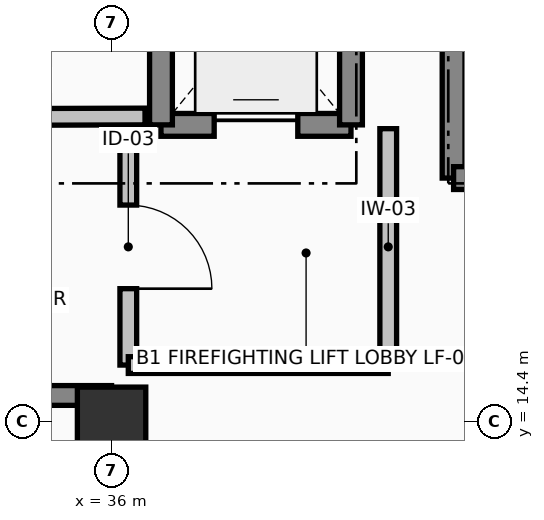
"""IFC4 building model, lengths in metres.
Left out: names, types, materials, properties, quantities, classifications, styles, units other than length and angle.
Written with IfcOpenShell. Run it as: python <this file> out.ifc"""

import sys

from ifc_helpers import new_model, si_unit, direction, frame, frame_2d, origin, origin_2d, place, context, subcontext, project, spatial, rectangle, extrude, element, fill, save


model = new_model("IFC4")
c1 = context("Model", 3, precision=1e-05, world=origin(), true_north=direction((0.0, 1.0)))
c2 = subcontext(c1, "Body", "Model", "MODEL_VIEW")
j1 = project(units=[si_unit("LENGTHUNIT", "METRE"), si_unit("PLANEANGLEUNIT", "RADIAN")], contexts=[c1])
p1 = place(None, origin())
s1 = spatial("IfcSite", under=j1, at=p1, CompositionType="ELEMENT")
p2 = place(p1, origin())
s2 = spatial("IfcBuilding", under=s1, at=p2, CompositionType="ELEMENT")
p3 = place(p2, frame((0.0, 0.0, -4.08)))
s3 = spatial("IfcBuildingStorey", under=s2, at=p3, CompositionType="ELEMENT", Elevation=-4.08)
p4 = place(p3, frame((36.0, 14.4, -0.42), z_axis=(0.0, 0.0, 1.0), x_axis=(1.0, 0.0, 0.0)))
e1 = element("IfcColumn", 1, at=p4, inside=s3, PredefinedType="COLUMN", context=c2, shape_type="SweptSolid", body=[
    extrude(rectangle(XDim=0.9, YDim=0.9, at=origin_2d()), origin(), (0.0, 0.0, 1.0), 4.5),
])
p5 = place(p3, frame((40.5, 17.6, 0.0), z_axis=(0.0, 0.0, 1.0), x_axis=(0.0, 1.0, 0.0)))
e2 = element("IfcWall", 2, at=p5, inside=s3, PredefinedType="SHEAR", context=c2, shape_type="SweptSolid", body=[
    extrude(rectangle(XDim=3.8, YDim=0.3, at=frame_2d((1.9, 0.0))), origin(), (0.0, 0.0, 1.0), 4.08),
])
p6 = place(p3, frame((40.5, 17.6, 0.0), z_axis=(0.0, 0.0, 1.0), x_axis=(1.0, 0.0, 0.0)))
e3 = element("IfcWall", 3, at=p6, inside=s3, PredefinedType="SHEAR", context=c2, shape_type="SweptSolid", body=[
    extrude(rectangle(XDim=9.0, YDim=0.3, at=frame_2d((4.5, 0.0))), origin(), (0.0, 0.0, 1.0), 4.08),
])
p7 = place(p6, frame((0.35, 0.0, 0.0)))
e4 = element("IfcOpeningElement", 4, at=p7, cuts=e3, PredefinedType="OPENING", context=c2, shape_type="SweptSolid", body=[
    extrude(rectangle(XDim=1.15, YDim=2.15, at=frame_2d((0.575, 1.075))), frame((0.0, 0.16, 0.0), z_axis=(0.0, -1.0, 0.0), x_axis=(1.0, 0.0, 0.0)), (0.0, 0.0, 1.0), 0.32),
])
p8 = place(p3, frame((36.65, 18.3, 0.0), z_axis=(0.0, 0.0, 1.0), x_axis=(1.0, 0.0, 0.0)))
e5 = element("IfcWall", 5, at=p8, inside=s3, PredefinedType="SHEAR", context=c2, shape_type="SweptSolid", body=[
    extrude(rectangle(XDim=2.5, YDim=0.3, at=frame_2d((1.25, 0.0))), origin(), (0.0, 0.0, 1.0), 4.08),
])
p9 = place(p8, frame((0.7, 0.0, 0.0)))
e6 = element("IfcOpeningElement", 6, at=p9, cuts=e5, PredefinedType="OPENING", context=c2, shape_type="SweptSolid", body=[
    extrude(rectangle(XDim=1.1, YDim=2.1, at=frame_2d((0.55, 1.05))), frame((0.0, 0.16, 0.0), z_axis=(0.0, -1.0, 0.0), x_axis=(1.0, 0.0, 0.0)), (0.0, 0.0, 1.0), 0.32),
])
for number, where, z_axis, x_axis in (
    (7, (36.65, 18.3, 0.0), (0.0, 0.0, 1.0), (0.0, 1.0, 0.0)),
    (8, (39.15, 18.3, 0.0), (0.0, 0.0, 1.0), (0.0, 1.0, 0.0)),
):
    element("IfcWall", number, at=place(p3, frame(where, z_axis=z_axis, x_axis=x_axis)), inside=s3, PredefinedType="SHEAR", context=c2, shape_type="SweptSolid", body=[
        extrude(rectangle(XDim=3.0, YDim=0.3, at=frame_2d((1.5, 0.0))), origin(), (0.0, 0.0, 1.0), 4.08),
    ])
p10 = place(p3, frame((36.22, 18.25, 0.0), z_axis=(0.0, 0.0, 1.0), x_axis=(0.0, -1.0, 0.0)))
e9 = element("IfcWall", 9, at=p10, inside=s3, PredefinedType="SOLIDWALL", context=c2, shape_type="SweptSolid", body=[
    extrude(rectangle(XDim=3.11, YDim=0.22, at=frame_2d((1.555, 0.0))), origin(), (0.0, 0.0, 1.0), 2.92),
])
p11 = place(p10, frame((1.005, 0.0, 0.0)))
e10 = element("IfcOpeningElement", 10, at=p11, cuts=e9, PredefinedType="OPENING", context=c2, shape_type="SweptSolid", body=[
    extrude(rectangle(XDim=1.1, YDim=2.15, at=frame_2d((0.55, 1.075))), frame((0.0, 0.12, 0.0), z_axis=(0.0, -1.0, 0.0), x_axis=(1.0, 0.0, 0.0)), (0.0, 0.0, 1.0), 0.24),
])
p12 = place(p3, frame((36.22, 15.14, 0.0), z_axis=(0.0, 0.0, 1.0), x_axis=(1.0, 0.0, 0.0)))
e11 = element("IfcWall", 11, at=p12, inside=s3, PredefinedType="SOLIDWALL", context=c2, shape_type="SweptSolid", body=[
    extrude(rectangle(XDim=3.42, YDim=0.22, at=frame_2d((1.71, 0.0))), origin(), (0.0, 0.0, 1.0), 3.78),
])
p13 = place(p3, frame((39.64, 15.14, 0.0), z_axis=(0.0, 0.0, 1.0), x_axis=(0.0, 1.0, 0.0)))
e12 = element("IfcWall", 12, at=p13, inside=s3, PredefinedType="SOLIDWALL", context=c2, shape_type="SweptSolid", body=[
    extrude(rectangle(XDim=3.11, YDim=0.22, at=frame_2d((1.555, 0.0))), origin(), (0.0, 0.0, 1.0), 3.78),
])
p14 = place(p3, frame((36.0, 0.22, 0.0), z_axis=(0.0, 0.0, 1.0), x_axis=(0.0, 1.0, 0.0)))
e13 = element("IfcWall", 13, at=p14, inside=s3, PredefinedType="SOLIDWALL", context=c2, shape_type="SweptSolid", body=[
    extrude(rectangle(XDim=14.52, YDim=0.26, at=frame_2d((7.26, 0.0))), origin(), (0.0, 0.0, 1.0), 3.78),
])
p15 = place(p3, frame((36.0, 14.74, 0.0), z_axis=(0.0, 0.0, 1.0), x_axis=(-1.0, 0.0, 0.0)))
e14 = element("IfcWall", 14, at=p15, inside=s3, PredefinedType="SOLIDWALL", context=c2, shape_type="SweptSolid", body=[
    extrude(rectangle(XDim=28.2, YDim=0.26, at=frame_2d((14.1, 0.0))), origin(), (0.0, 0.0, 1.0), 3.78),
])
p16 = place(p15, frame((13.752, 0.0, 0.0)))
e15 = element("IfcOpeningElement", 15, at=p16, cuts=e14, PredefinedType="OPENING", context=c2, shape_type="SweptSolid", body=[
    extrude(rectangle(XDim=1.6, YDim=2.25, at=frame_2d((0.8, 1.125))), frame((0.0, 0.14, 0.0), z_axis=(0.0, -1.0, 0.0), x_axis=(1.0, 0.0, 0.0)), (0.0, 0.0, 1.0), 0.28),
])
p17 = place(p3, frame((33.21, 18.4, 0.0), z_axis=(0.0, 0.0, 1.0), x_axis=(0.99999519808, 0.003099002503, 0.0)))
e16 = element("IfcWall", 16, at=p17, inside=s3, PredefinedType="SOLIDWALL", context=c2, shape_type="SweptSolid", body=[
    extrude(rectangle(XDim=3.23, YDim=0.22, at=frame_2d((1.615, 0.0))), origin(), (0.0, 0.0, 1.0), 3.78),
])
p18 = place(p9, origin())
e17 = element("IfcDoor", 17, at=p18, inside=s3, OperationType="SLIDING_TO_LEFT", PredefinedType="DOOR", context=c2, shape_type="SweptSolid", body=[
    extrude(rectangle(XDim=1.1, YDim=2.1, at=frame_2d((0.55, 1.05))), frame((0.0, 0.025, 0.0), z_axis=(0.0, -1.0, 0.0), x_axis=(1.0, 0.0, 0.0)), (0.0, 0.0, 1.0), 0.05),
])
fill(e6, e17)
p19 = place(p11, origin())
e18 = element("IfcDoor", 18, at=p19, inside=s3, OperationType="SINGLE_SWING_RIGHT", PredefinedType="DOOR", context=c2, shape_type="SweptSolid", body=[
    extrude(rectangle(XDim=1.1, YDim=2.15, at=frame_2d((0.55, 1.075))), frame((0.0, 0.025, 0.0), z_axis=(0.0, -1.0, 0.0), x_axis=(1.0, 0.0, 0.0)), (0.0, 0.0, 1.0), 0.05),
])
fill(e10, e18)
save(model, sys.argv[1])
